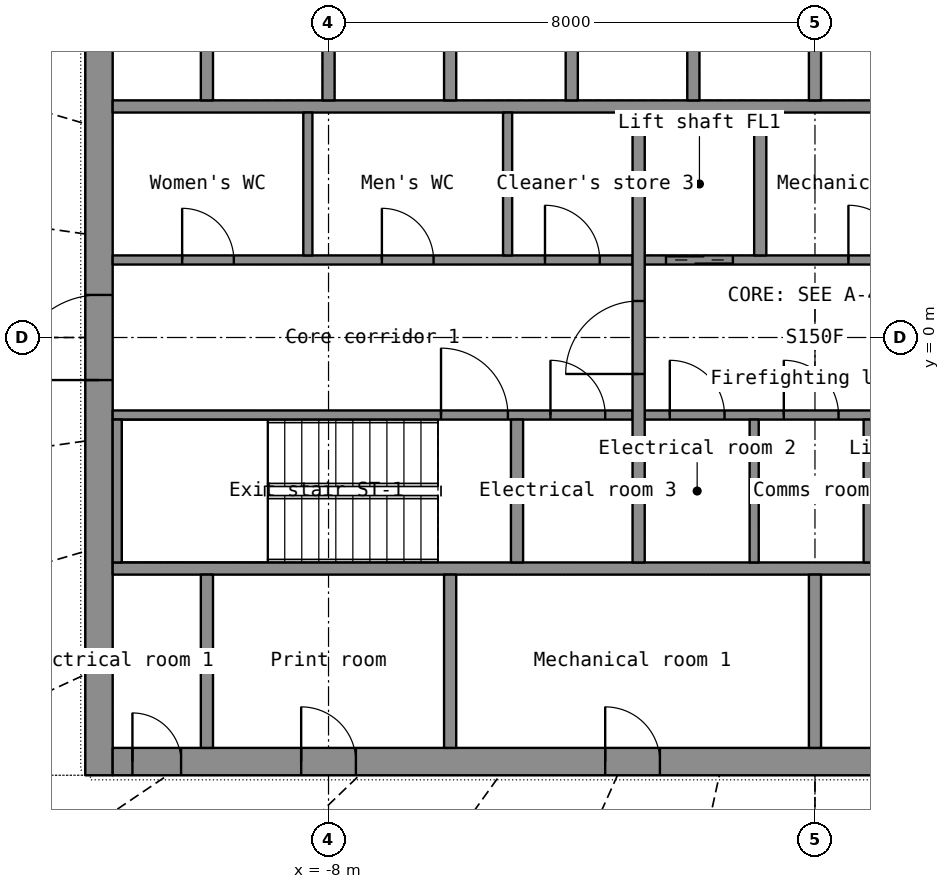
"""IFC4 building model, lengths in metres.
Left out: names, types, materials, properties, quantities, classifications, styles, units other than length and angle.
Written with IfcOpenShell. Run it as: python <this file> out.ifc"""

import sys

from ifc_helpers import new_model, si_unit, direction, frame, frame_2d, origin, place, context, subcontext, project, spatial, rectangle, extrude, element, fill, save


model = new_model("IFC4")
c1 = context("Model", 3, precision=1e-05, world=origin(), true_north=direction((0.0, 1.0)))
c2 = subcontext(c1, "Body", "Model", "MODEL_VIEW")
j1 = project(units=[si_unit("LENGTHUNIT", "METRE"), si_unit("PLANEANGLEUNIT", "RADIAN")], contexts=[c1])
p1 = place(None, origin())
s1 = spatial("IfcSite", under=j1, at=p1, CompositionType="ELEMENT")
p2 = place(p1, origin())
s2 = spatial("IfcBuilding", under=s1, at=p2, CompositionType="ELEMENT")
p3 = place(p2, frame((0.0, 0.0, 194.1)))
s3 = spatial("IfcBuildingStorey", under=s2, at=p3, CompositionType="ELEMENT", Elevation=194.1)
p4 = place(p3, frame((-11.775, -7.2, 0.0), z_axis=(0.0, 0.0, 1.0), x_axis=(0.0, 1.0, 0.0)))
e1 = element("IfcWall", 1, at=p4, inside=s3, PredefinedType="SHEAR", context=c2, shape_type="SweptSolid", body=[
    extrude(rectangle(XDim=14.4, YDim=0.45, at=frame_2d((7.2, 0.0))), origin(), (0.0, 0.0, 1.0), 3.3),
])
p5 = place(p4, frame((6.5, 0.0, 0.0)))
e2 = element("IfcOpeningElement", 2, at=p5, cuts=e1, PredefinedType="OPENING", context=c2, shape_type="SweptSolid", body=[
    extrude(rectangle(XDim=1.4, YDim=2.2, at=frame_2d((0.7, 1.1))), frame((0.0, 0.235, 0.0), z_axis=(0.0, -1.0, 0.0), x_axis=(1.0, 0.0, 0.0)), (0.0, 0.0, 1.0), 0.47),
])
p6 = place(p3, frame((-11.55, -6.975, 0.0), z_axis=(0.0, 0.0, 1.0), x_axis=(1.0, 0.0, 0.0)))
e3 = element("IfcWall", 3, at=p6, inside=s3, PredefinedType="SHEAR", context=c2, shape_type="SweptSolid", body=[
    extrude(rectangle(XDim=23.1, YDim=0.45, at=frame_2d((11.55, 0.0))), origin(), (0.0, 0.0, 1.0), 3.3),
])
p7 = place(p6, frame((20.0, 0.0, 0.0)))
e4 = element("IfcOpeningElement", 4, at=p7, cuts=e3, PredefinedType="OPENING", context=c2, shape_type="SweptSolid", body=[
    extrude(rectangle(XDim=1.1, YDim=2.2, at=frame_2d((0.55, 1.1))), frame((0.0, 0.235, 0.0), z_axis=(0.0, -1.0, 0.0), x_axis=(1.0, 0.0, 0.0)), (0.0, 0.0, 1.0), 0.47),
])
p8 = place(p6, frame((3.1, 0.0, 0.0)))
e5 = element("IfcOpeningElement", 5, at=p8, cuts=e3, PredefinedType="OPENING", context=c2, shape_type="SweptSolid", body=[
    extrude(rectangle(XDim=0.9, YDim=2.1, at=frame_2d((0.45, 1.05))), frame((0.0, 0.235, 0.0), z_axis=(0.0, -1.0, 0.0), x_axis=(1.0, 0.0, 0.0)), (0.0, 0.0, 1.0), 0.47),
])
p9 = place(p6, frame((8.1, 0.0, 0.0)))
e6 = element("IfcOpeningElement", 6, at=p9, cuts=e3, PredefinedType="OPENING", context=c2, shape_type="SweptSolid", body=[
    extrude(rectangle(XDim=0.9, YDim=2.1, at=frame_2d((0.45, 1.05))), frame((0.0, 0.235, 0.0), z_axis=(0.0, -1.0, 0.0), x_axis=(1.0, 0.0, 0.0)), (0.0, 0.0, 1.0), 0.47),
])
p10 = place(p6, frame((15.1, 0.0, 0.0)))
e7 = element("IfcOpeningElement", 7, at=p10, cuts=e3, PredefinedType="OPENING", context=c2, shape_type="SweptSolid", body=[
    extrude(rectangle(XDim=0.9, YDim=2.1, at=frame_2d((0.45, 1.05))), frame((0.0, 0.235, 0.0), z_axis=(0.0, -1.0, 0.0), x_axis=(1.0, 0.0, 0.0)), (0.0, 0.0, 1.0), 0.47),
])
p11 = place(p6, frame((0.325, 0.0, 0.0)))
e8 = element("IfcOpeningElement", 8, at=p11, cuts=e3, PredefinedType="OPENING", context=c2, shape_type="SweptSolid", body=[
    extrude(rectangle(XDim=0.8, YDim=2.05, at=frame_2d((0.4, 1.025))), frame((0.0, 0.235, 0.0), z_axis=(0.0, -1.0, 0.0), x_axis=(1.0, 0.0, 0.0)), (0.0, 0.0, 1.0), 0.47),
])
p12 = place(p6, frame((21.975, 0.0, 0.0)))
e9 = element("IfcOpeningElement", 9, at=p12, cuts=e3, PredefinedType="OPENING", context=c2, shape_type="SweptSolid", body=[
    extrude(rectangle(XDim=0.8, YDim=2.05, at=frame_2d((0.4, 1.025))), frame((0.0, 0.235, 0.0), z_axis=(0.0, -1.0, 0.0), x_axis=(1.0, 0.0, 0.0)), (0.0, 0.0, 1.0), 0.47),
])
for number, where, z_axis, x_axis in (
    (10, (-11.55, -3.8, 0.0), (0.0, 0.0, 1.0), (1.0, 0.0, 0.0)),
    (11, (-11.55, 3.8, 0.0), (0.0, 0.0, 1.0), (1.0, 0.0, 0.0)),
):
    element("IfcWall", number, at=place(p3, frame(where, z_axis=z_axis, x_axis=x_axis)), inside=s3, PredefinedType="SHEAR", context=c2, shape_type="SweptSolid", body=[
        extrude(rectangle(XDim=23.1, YDim=0.2, at=frame_2d((11.55, 0.0))), origin(), (0.0, 0.0, 1.0), 3.3),
    ])
p13 = place(p3, frame((-10.0, -6.75, 0.0), z_axis=(0.0, 0.0, 1.0), x_axis=(0.0, 1.0, 0.0)))
e12 = element("IfcWall", 12, at=p13, inside=s3, PredefinedType="SHEAR", context=c2, shape_type="SweptSolid", body=[
    extrude(rectangle(XDim=2.85, YDim=0.2, at=frame_2d((1.425, 0.0))), origin(), (0.0, 0.0, 1.0), 3.3),
])
for number, where, z_axis, x_axis in (
    (13, (-6.0, -6.75, 0.0), (0.0, 0.0, 1.0), (0.0, 1.0, 0.0)),
    (14, (0.0, -6.75, 0.0), (0.0, 0.0, 1.0), (0.0, 1.0, 0.0)),
):
    element("IfcWall", number, at=place(p3, frame(where, z_axis=z_axis, x_axis=x_axis)), inside=s3, PredefinedType="PARTITIONING", context=c2, shape_type="SweptSolid", body=[
        extrude(rectangle(XDim=2.85, YDim=0.2, at=frame_2d((1.425, 0.0))), origin(), (0.0, 0.0, 1.0), 3.3),
    ])
for number, where, z_axis, x_axis in (
    (15, (-10.0, 3.9, 0.0), (0.0, 0.0, 1.0), (0.0, 1.0, 0.0)),
    (16, (-8.0, 3.9, 0.0), (0.0, 0.0, 1.0), (0.0, 1.0, 0.0)),
    (17, (-6.0, 3.9, 0.0), (0.0, 0.0, 1.0), (0.0, 1.0, 0.0)),
    (18, (-4.0, 3.9, 0.0), (0.0, 0.0, 1.0), (0.0, 1.0, 0.0)),
    (19, (-2.0, 3.9, 0.0), (0.0, 0.0, 1.0), (0.0, 1.0, 0.0)),
    (20, (0.0, 3.9, 0.0), (0.0, 0.0, 1.0), (0.0, 1.0, 0.0)),
):
    element("IfcWall", number, at=place(p3, frame(where, z_axis=z_axis, x_axis=x_axis)), inside=s3, PredefinedType="SHEAR", context=c2, shape_type="SweptSolid", body=[
        extrude(rectangle(XDim=2.85, YDim=0.2, at=frame_2d((1.425, 0.0))), origin(), (0.0, 0.0, 1.0), 3.3),
    ])
p14 = place(p3, frame((-11.55, -1.275, 0.0), z_axis=(0.0, 0.0, 1.0), x_axis=(1.0, 0.0, 0.0)))
e21 = element("IfcWall", 21, at=p14, inside=s3, PredefinedType="SHEAR", context=c2, shape_type="SweptSolid", body=[
    extrude(rectangle(XDim=8.55, YDim=0.15, at=frame_2d((4.275, 0.0))), origin(), (0.0, 0.0, 1.0), 3.3),
])
p15 = place(p14, frame((5.4, 0.0, 0.0)))
e22 = element("IfcOpeningElement", 22, at=p15, cuts=e21, PredefinedType="OPENING", context=c2, shape_type="SweptSolid", body=[
    extrude(rectangle(XDim=1.1, YDim=2.15, at=frame_2d((0.55, 1.075))), frame((0.0, 0.085, 0.0), z_axis=(0.0, -1.0, 0.0), x_axis=(1.0, 0.0, 0.0)), (0.0, 0.0, 1.0), 0.17),
])
p16 = place(p14, frame((7.2, 0.0, 0.0)))
e23 = element("IfcOpeningElement", 23, at=p16, cuts=e21, PredefinedType="OPENING", context=c2, shape_type="SweptSolid", body=[
    extrude(rectangle(XDim=0.9, YDim=2.1, at=frame_2d((0.45, 1.05))), frame((0.0, 0.085, 0.0), z_axis=(0.0, -1.0, 0.0), x_axis=(1.0, 0.0, 0.0)), (0.0, 0.0, 1.0), 0.17),
])
p17 = place(p3, frame((-2.8, -1.275, 0.0), z_axis=(0.0, 0.0, 1.0), x_axis=(1.0, 0.0, 0.0)))
e24 = element("IfcWall", 24, at=p17, inside=s3, PredefinedType="SHEAR", context=c2, shape_type="SweptSolid", body=[
    extrude(rectangle(XDim=5.6, YDim=0.15, at=frame_2d((2.8, 0.0))), origin(), (0.0, 0.0, 1.0), 3.3),
])
p18 = place(p17, frame((4.15, 0.0, 0.0)))
e25 = element("IfcOpeningElement", 25, at=p18, cuts=e24, PredefinedType="OPENING", context=c2, shape_type="SweptSolid", body=[
    extrude(rectangle(XDim=1.1, YDim=2.2, at=frame_2d((0.55, 1.1))), frame((0.0, 0.085, 0.0), z_axis=(0.0, -1.0, 0.0), x_axis=(1.0, 0.0, 0.0)), (0.0, 0.0, 1.0), 0.17),
])
p19 = place(p17, frame((0.413, 0.0, 0.0)))
e26 = element("IfcOpeningElement", 26, at=p19, cuts=e24, PredefinedType="OPENING", context=c2, shape_type="SweptSolid", body=[
    extrude(rectangle(XDim=0.9, YDim=2.1, at=frame_2d((0.45, 1.05))), frame((0.0, 0.085, 0.0), z_axis=(0.0, -1.0, 0.0), x_axis=(1.0, 0.0, 0.0)), (0.0, 0.0, 1.0), 0.17),
])
p20 = place(p17, frame((2.288, 0.0, 0.0)))
e27 = element("IfcOpeningElement", 27, at=p20, cuts=e24, PredefinedType="OPENING", context=c2, shape_type="SweptSolid", body=[
    extrude(rectangle(XDim=0.9, YDim=2.1, at=frame_2d((0.45, 1.05))), frame((0.0, 0.085, 0.0), z_axis=(0.0, -1.0, 0.0), x_axis=(1.0, 0.0, 0.0)), (0.0, 0.0, 1.0), 0.17),
])
p21 = place(p3, frame((-11.55, 1.275, 0.0), z_axis=(0.0, 0.0, 1.0), x_axis=(1.0, 0.0, 0.0)))
e28 = element("IfcWall", 28, at=p21, inside=s3, PredefinedType="PARTITIONING", context=c2, shape_type="SweptSolid", body=[
    extrude(rectangle(XDim=8.55, YDim=0.15, at=frame_2d((4.275, 0.0))), origin(), (0.0, 0.0, 1.0), 3.3),
])
p22 = place(p21, frame((1.143, 0.0, 0.0)))
e29 = element("IfcOpeningElement", 29, at=p22, cuts=e28, PredefinedType="OPENING", context=c2, shape_type="SweptSolid", body=[
    extrude(rectangle(XDim=0.85, YDim=2.1, at=frame_2d((0.425, 1.05))), frame((0.0, 0.085, 0.0), z_axis=(0.0, -1.0, 0.0), x_axis=(1.0, 0.0, 0.0)), (0.0, 0.0, 1.0), 0.17),
])
p23 = place(p21, frame((4.427, 0.0, 0.0)))
e30 = element("IfcOpeningElement", 30, at=p23, cuts=e28, PredefinedType="OPENING", context=c2, shape_type="SweptSolid", body=[
    extrude(rectangle(XDim=0.85, YDim=2.1, at=frame_2d((0.425, 1.05))), frame((0.0, 0.085, 0.0), z_axis=(0.0, -1.0, 0.0), x_axis=(1.0, 0.0, 0.0)), (0.0, 0.0, 1.0), 0.17),
])
p24 = place(p21, frame((7.11, 0.0, 0.0)))
e31 = element("IfcOpeningElement", 31, at=p24, cuts=e28, PredefinedType="OPENING", context=c2, shape_type="SweptSolid", body=[
    extrude(rectangle(XDim=0.9, YDim=2.1, at=frame_2d((0.45, 1.05))), frame((0.0, 0.085, 0.0), z_axis=(0.0, -1.0, 0.0), x_axis=(1.0, 0.0, 0.0)), (0.0, 0.0, 1.0), 0.17),
])
p25 = place(p3, frame((-2.8, 1.275, 0.0), z_axis=(0.0, 0.0, 1.0), x_axis=(1.0, 0.0, 0.0)))
e32 = element("IfcWall", 32, at=p25, inside=s3, PredefinedType="SHEAR", context=c2, shape_type="SweptSolid", body=[
    extrude(rectangle(XDim=5.6, YDim=0.15, at=frame_2d((2.8, 0.0))), origin(), (0.0, 0.0, 1.0), 3.3),
])
p26 = place(p25, frame((0.35, 0.0, 0.0)))
e33 = element("IfcOpeningElement", 33, at=p26, cuts=e32, PredefinedType="OPENING", context=c2, shape_type="SweptSolid", body=[
    extrude(rectangle(XDim=1.1, YDim=2.2, at=frame_2d((0.55, 1.1))), frame((0.0, 0.085, 0.0), z_axis=(0.0, -1.0, 0.0), x_axis=(1.0, 0.0, 0.0)), (0.0, 0.0, 1.0), 0.17),
])
p27 = place(p25, frame((3.35, 0.0, 0.0)))
e34 = element("IfcOpeningElement", 34, at=p27, cuts=e32, PredefinedType="OPENING", context=c2, shape_type="SweptSolid", body=[
    extrude(rectangle(XDim=0.9, YDim=2.1, at=frame_2d((0.45, 1.05))), frame((0.0, 0.085, 0.0), z_axis=(0.0, -1.0, 0.0), x_axis=(1.0, 0.0, 0.0)), (0.0, 0.0, 1.0), 0.17),
])
p28 = place(p3, frame((-2.9, -3.7, 0.0), z_axis=(0.0, 0.0, 1.0), x_axis=(0.0, 1.0, 0.0)))
e35 = element("IfcWall", 35, at=p28, inside=s3, PredefinedType="SHEAR", context=c2, shape_type="SweptSolid", body=[
    extrude(rectangle(XDim=7.4, YDim=0.2, at=frame_2d((3.7, 0.0))), origin(), (0.0, 0.0, 1.0), 3.3),
])
p29 = place(p28, frame((3.1, 0.0, 0.0)))
e36 = element("IfcOpeningElement", 36, at=p29, cuts=e35, PredefinedType="OPENING", context=c2, shape_type="SweptSolid", body=[
    extrude(rectangle(XDim=1.2, YDim=2.2, at=frame_2d((0.6, 1.1))), frame((0.0, 0.11, 0.0), z_axis=(0.0, -1.0, 0.0), x_axis=(1.0, 0.0, 0.0)), (0.0, 0.0, 1.0), 0.22),
])
for number, where, z_axis, x_axis in (
    (37, (-0.9, 1.35, 0.0), (0.0, 0.0, 1.0), (0.0, 1.0, 0.0)),
    (38, (0.9, -3.7, 0.0), (0.0, 0.0, 1.0), (0.0, 1.0, 0.0)),
):
    element("IfcWall", number, at=place(p3, frame(where, z_axis=z_axis, x_axis=x_axis)), inside=s3, PredefinedType="SHEAR", context=c2, shape_type="SweptSolid", body=[
        extrude(rectangle(XDim=2.35, YDim=0.2, at=frame_2d((1.175, 0.0))), origin(), (0.0, 0.0, 1.0), 3.3),
    ])
p30 = place(p3, frame((-11.475, -3.7, 0.0), z_axis=(0.0, 0.0, 1.0), x_axis=(0.0, 1.0, 0.0)))
e39 = element("IfcWall", 39, at=p30, inside=s3, PredefinedType="SHEAR", context=c2, shape_type="SweptSolid", body=[
    extrude(rectangle(XDim=2.35, YDim=0.15, at=frame_2d((1.175, 0.0))), origin(), (0.0, 0.0, 1.0), 3.3),
])
p31 = place(p3, frame((-4.9, -3.7, 0.0), z_axis=(0.0, 0.0, 1.0), x_axis=(0.0, 1.0, 0.0)))
e40 = element("IfcWall", 40, at=p31, inside=s3, PredefinedType="SHEAR", context=c2, shape_type="SweptSolid", body=[
    extrude(rectangle(XDim=2.35, YDim=0.2, at=frame_2d((1.175, 0.0))), origin(), (0.0, 0.0, 1.0), 3.3),
])
for number, where, z_axis, x_axis in (
    (41, (-8.34, 1.35, 0.0), (0.0, 0.0, 1.0), (0.0, 1.0, 0.0)),
    (42, (-5.055, 1.35, 0.0), (0.0, 0.0, 1.0), (0.0, 1.0, 0.0)),
    (43, (-1.0, -3.7, 0.0), (0.0, 0.0, 1.0), (0.0, 1.0, 0.0)),
):
    element("IfcWall", number, at=place(p3, frame(where, z_axis=z_axis, x_axis=x_axis)), inside=s3, PredefinedType="PARTITIONING", context=c2, shape_type="SweptSolid", body=[
        extrude(rectangle(XDim=2.35, YDim=0.15, at=frame_2d((1.175, 0.0))), origin(), (0.0, 0.0, 1.0), 3.3),
    ])
p32 = place(p8, origin())
e44 = element("IfcDoor", 44, at=p32, inside=s3, OperationType="SINGLE_SWING_LEFT", PredefinedType="DOOR", context=c2, shape_type="SweptSolid", body=[
    extrude(rectangle(XDim=0.9, YDim=2.1, at=frame_2d((0.45, 1.05))), frame((0.0, 0.025, 0.0), z_axis=(0.0, -1.0, 0.0), x_axis=(1.0, 0.0, 0.0)), (0.0, 0.0, 1.0), 0.05),
])
fill(e5, e44)
p33 = place(p9, origin())
e45 = element("IfcDoor", 45, at=p33, inside=s3, OperationType="SINGLE_SWING_LEFT", PredefinedType="DOOR", context=c2, shape_type="SweptSolid", body=[
    extrude(rectangle(XDim=0.9, YDim=2.1, at=frame_2d((0.45, 1.05))), frame((0.0, 0.025, 0.0), z_axis=(0.0, -1.0, 0.0), x_axis=(1.0, 0.0, 0.0)), (0.0, 0.0, 1.0), 0.05),
])
fill(e6, e45)
p34 = place(p11, origin())
e46 = element("IfcDoor", 46, at=p34, inside=s3, OperationType="SINGLE_SWING_LEFT", PredefinedType="DOOR", context=c2, shape_type="SweptSolid", body=[
    extrude(rectangle(XDim=0.8, YDim=2.05, at=frame_2d((0.4, 1.025))), frame((0.0, 0.025, 0.0), z_axis=(0.0, -1.0, 0.0), x_axis=(1.0, 0.0, 0.0)), (0.0, 0.0, 1.0), 0.05),
])
fill(e8, e46)
p35 = place(p5, origin())
e47 = element("IfcDoor", 47, at=p35, inside=s3, OperationType="DOUBLE_DOOR_SINGLE_SWING", PredefinedType="DOOR", context=c2, shape_type="SweptSolid", body=[
    extrude(rectangle(XDim=1.4, YDim=2.2, at=frame_2d((0.7, 1.1))), frame((0.0, 0.025, 0.0), z_axis=(0.0, -1.0, 0.0), x_axis=(1.0, 0.0, 0.0)), (0.0, 0.0, 1.0), 0.05),
])
fill(e2, e47)
p36 = place(p29, origin())
e48 = element("IfcDoor", 48, at=p36, inside=s3, OperationType="SINGLE_SWING_LEFT", PredefinedType="DOOR", context=c2, shape_type="SweptSolid", body=[
    extrude(rectangle(XDim=1.2, YDim=2.2, at=frame_2d((0.6, 1.1))), frame((0.0, 0.025, 0.0), z_axis=(0.0, -1.0, 0.0), x_axis=(1.0, 0.0, 0.0)), (0.0, 0.0, 1.0), 0.05),
])
fill(e36, e48)
p37 = place(p26, origin())
e49 = element("IfcDoor", 49, at=p37, inside=s3, OperationType="DOUBLE_DOOR_SLIDING", PredefinedType="DOOR", context=c2, shape_type="SweptSolid", body=[
    extrude(rectangle(XDim=1.1, YDim=2.2, at=frame_2d((0.55, 1.1))), frame((0.0, 0.025, 0.0), z_axis=(0.0, -1.0, 0.0), x_axis=(1.0, 0.0, 0.0)), (0.0, 0.0, 1.0), 0.05),
])
fill(e33, e49)
p38 = place(p15, origin())
e50 = element("IfcDoor", 50, at=p38, inside=s3, OperationType="SINGLE_SWING_LEFT", PredefinedType="DOOR", context=c2, shape_type="SweptSolid", body=[
    extrude(rectangle(XDim=1.1, YDim=2.15, at=frame_2d((0.55, 1.075))), frame((0.0, 0.025, 0.0), z_axis=(0.0, -1.0, 0.0), x_axis=(1.0, 0.0, 0.0)), (0.0, 0.0, 1.0), 0.05),
])
fill(e22, e50)
p39 = place(p22, origin())
e51 = element("IfcDoor", 51, at=p39, inside=s3, OperationType="SINGLE_SWING_LEFT", PredefinedType="DOOR", context=c2, shape_type="SweptSolid", body=[
    extrude(rectangle(XDim=0.85, YDim=2.1, at=frame_2d((0.425, 1.05))), frame((0.0, 0.025, 0.0), z_axis=(0.0, -1.0, 0.0), x_axis=(1.0, 0.0, 0.0)), (0.0, 0.0, 1.0), 0.05),
])
fill(e29, e51)
p40 = place(p23, origin())
e52 = element("IfcDoor", 52, at=p40, inside=s3, OperationType="SINGLE_SWING_LEFT", PredefinedType="DOOR", context=c2, shape_type="SweptSolid", body=[
    extrude(rectangle(XDim=0.85, YDim=2.1, at=frame_2d((0.425, 1.05))), frame((0.0, 0.025, 0.0), z_axis=(0.0, -1.0, 0.0), x_axis=(1.0, 0.0, 0.0)), (0.0, 0.0, 1.0), 0.05),
])
fill(e30, e52)
p41 = place(p24, origin())
e53 = element("IfcDoor", 53, at=p41, inside=s3, OperationType="SINGLE_SWING_LEFT", PredefinedType="DOOR", context=c2, shape_type="SweptSolid", body=[
    extrude(rectangle(XDim=0.9, YDim=2.1, at=frame_2d((0.45, 1.05))), frame((0.0, 0.025, 0.0), z_axis=(0.0, -1.0, 0.0), x_axis=(1.0, 0.0, 0.0)), (0.0, 0.0, 1.0), 0.05),
])
fill(e31, e53)
p42 = place(p27, origin())
e54 = element("IfcDoor", 54, at=p42, inside=s3, OperationType="SINGLE_SWING_LEFT", PredefinedType="DOOR", context=c2, shape_type="SweptSolid", body=[
    extrude(rectangle(XDim=0.9, YDim=2.1, at=frame_2d((0.45, 1.05))), frame((0.0, 0.025, 0.0), z_axis=(0.0, -1.0, 0.0), x_axis=(1.0, 0.0, 0.0)), (0.0, 0.0, 1.0), 0.05),
])
fill(e34, e54)
p43 = place(p19, origin())
e55 = element("IfcDoor", 55, at=p43, inside=s3, OperationType="SINGLE_SWING_LEFT", PredefinedType="DOOR", context=c2, shape_type="SweptSolid", body=[
    extrude(rectangle(XDim=0.9, YDim=2.1, at=frame_2d((0.45, 1.05))), frame((0.0, 0.025, 0.0), z_axis=(0.0, -1.0, 0.0), x_axis=(1.0, 0.0, 0.0)), (0.0, 0.0, 1.0), 0.05),
])
fill(e26, e55)
p44 = place(p20, origin())
e56 = element("IfcDoor", 56, at=p44, inside=s3, OperationType="SINGLE_SWING_LEFT", PredefinedType="DOOR", context=c2, shape_type="SweptSolid", body=[
    extrude(rectangle(XDim=0.9, YDim=2.1, at=frame_2d((0.45, 1.05))), frame((0.0, 0.025, 0.0), z_axis=(0.0, -1.0, 0.0), x_axis=(1.0, 0.0, 0.0)), (0.0, 0.0, 1.0), 0.05),
])
fill(e27, e56)
p45 = place(p16, origin())
e57 = element("IfcDoor", 57, at=p45, inside=s3, OperationType="SINGLE_SWING_LEFT", PredefinedType="DOOR", context=c2, shape_type="SweptSolid", body=[
    extrude(rectangle(XDim=0.9, YDim=2.1, at=frame_2d((0.45, 1.05))), frame((0.0, 0.025, 0.0), z_axis=(0.0, -1.0, 0.0), x_axis=(1.0, 0.0, 0.0)), (0.0, 0.0, 1.0), 0.05),
])
fill(e23, e57)
save(model, sys.argv[1])
